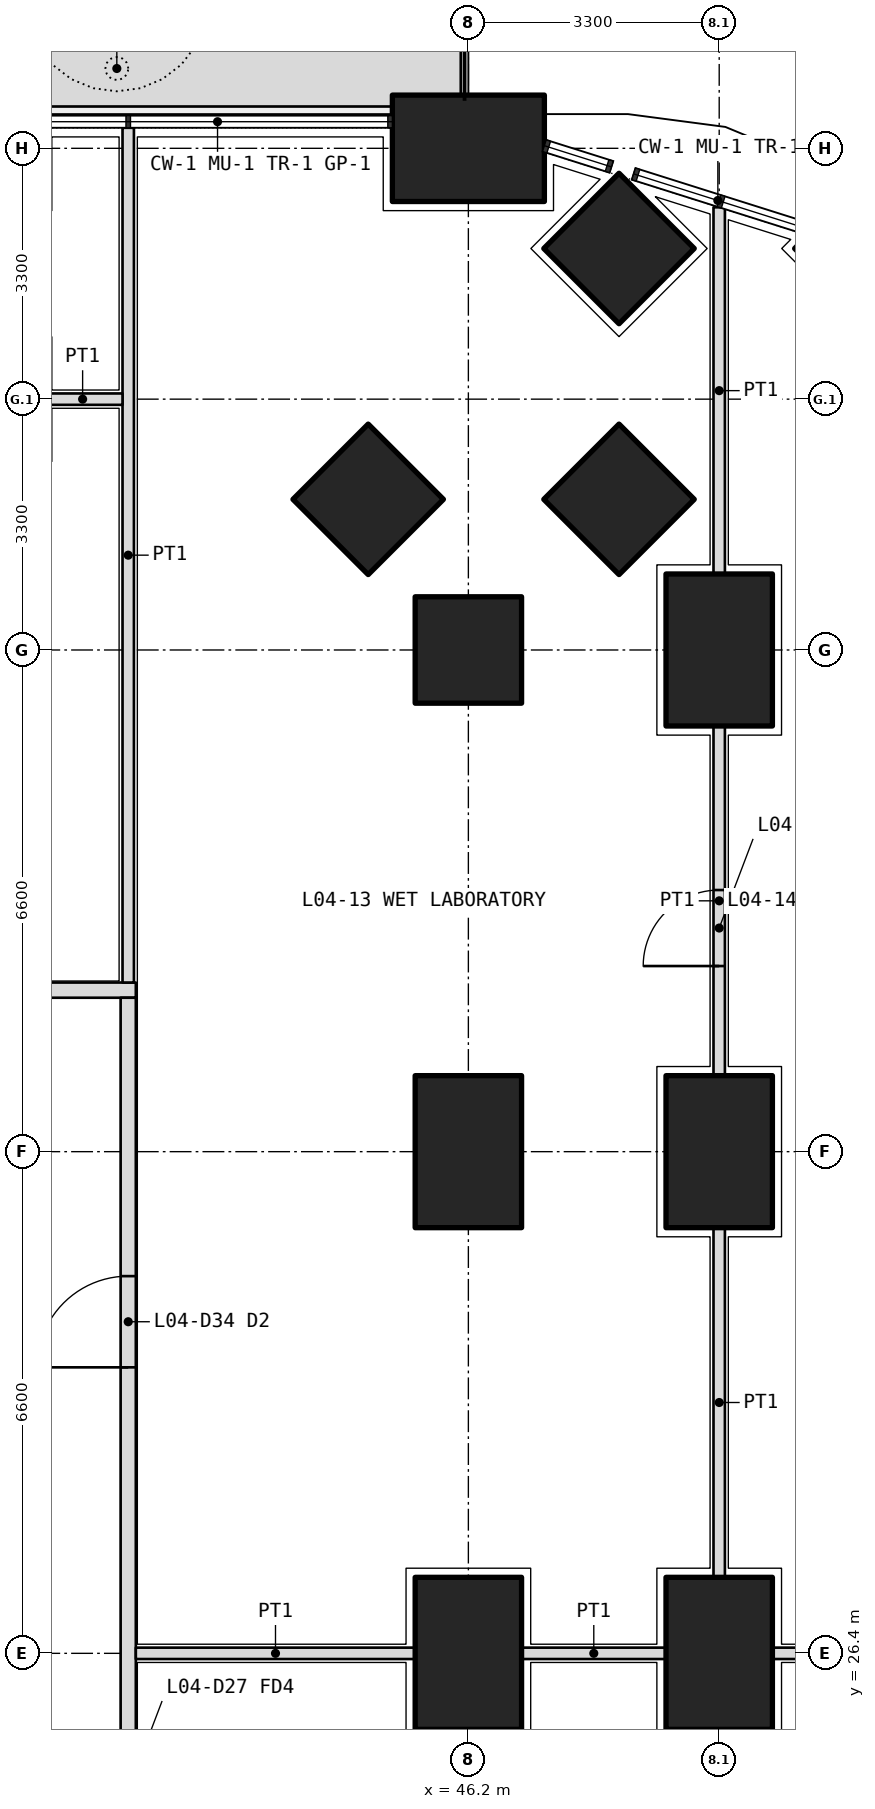
"""IFC4 building model, lengths in metres.
Left out: names, types, materials, properties, quantities, classifications, styles, units other than length and angle.
Written with IfcOpenShell. Run it as: python <this file> out.ifc"""

import sys

from ifc_helpers import new_model, si_unit, direction, frame, frame_2d, origin, origin_2d, place, context, subcontext, project, spatial, polyline, rectangle, outline, extrude, element, fill, save


model = new_model("IFC4")
c1 = context("Model", 3, precision=1e-05, world=origin(), true_north=direction((0.0, 1.0)))
c2 = subcontext(c1, "Body", "Model", "MODEL_VIEW")
j1 = project(units=[si_unit("LENGTHUNIT", "METRE"), si_unit("PLANEANGLEUNIT", "RADIAN")], contexts=[c1])
p1 = place(None, origin())
s1 = spatial("IfcSite", under=j1, at=p1, CompositionType="ELEMENT")
p2 = place(p1, origin())
s2 = spatial("IfcBuilding", under=s1, at=p2, CompositionType="ELEMENT")
p3 = place(p2, frame((0.0, 0.0, 21.3)))
s3 = spatial("IfcBuildingStorey", under=s2, at=p3, CompositionType="ELEMENT", Elevation=21.3)
p4 = place(p3, frame((51.482, 44.882, 0.0), z_axis=(0.0, 0.0, 1.0), x_axis=(0.707106781187, 0.707106781187, 0.0)))
e1 = element("IfcColumn", 1, at=p4, inside=s3, PredefinedType="COLUMN", context=c2, shape_type="SweptSolid", body=[
    extrude(rectangle(XDim=1.4, YDim=1.4, at=origin_2d()), origin(), (0.0, 0.0, 1.0), 4.2),
])
p5 = place(p3, frame((46.2, 46.2, 0.0), z_axis=(0.0, 0.0, 1.0), x_axis=(1.0, 0.0, 0.0)))
e2 = element("IfcColumn", 2, at=p5, inside=s3, PredefinedType="COLUMN", context=c2, shape_type="SweptSolid", body=[
    extrude(rectangle(XDim=2.0, YDim=1.4, at=origin_2d()), origin(), (0.0, 0.0, 1.0), 4.2),
])
for number, where, z_axis, x_axis in (
    (3, (46.2, 39.6, 0.0), (0.0, 0.0, 1.0), (1.0, 0.0, 0.0)),
    (4, (48.182, 44.882, 0.0), (0.0, 0.0, 1.0), (0.707, 0.707, 0.0)),
):
    element("IfcColumn", number, at=place(p3, frame(where, z_axis=z_axis, x_axis=x_axis)), inside=s3, PredefinedType="COLUMN", context=c2, shape_type="SweptSolid", body=[
        extrude(rectangle(XDim=1.4, YDim=1.4, at=origin_2d()), origin(), (0.0, 0.0, 1.0), 4.2),
    ])
for number, where, z_axis, x_axis in (
    (5, (49.5, 26.4, 0.0), (0.0, 0.0, 1.0), (0.0, 1.0, 0.0)),
    (6, (49.5, 33.0, 0.0), (0.0, 0.0, 1.0), (0.0, 1.0, 0.0)),
    (7, (49.5, 39.6, 0.0), (0.0, 0.0, 1.0), (0.0, 1.0, 0.0)),
):
    element("IfcColumn", number, at=place(p3, frame(where, z_axis=z_axis, x_axis=x_axis)), inside=s3, PredefinedType="COLUMN", context=c2, shape_type="SweptSolid", body=[
        extrude(rectangle(XDim=2.0, YDim=1.4, at=origin_2d()), origin(), (0.0, 0.0, 1.0), 4.2),
    ])
for number, where, z_axis, x_axis in (
    (8, (48.182, 41.582, 0.0), (0.0, 0.0, 1.0), (0.707, 0.707, 0.0)),
    (9, (44.882, 41.582, 0.0), (0.0, 0.0, 1.0), (0.707, 0.707, 0.0)),
):
    element("IfcColumn", number, at=place(p3, frame(where, z_axis=z_axis, x_axis=x_axis)), inside=s3, PredefinedType="COLUMN", context=c2, shape_type="SweptSolid", body=[
        extrude(rectangle(XDim=1.4, YDim=1.4, at=origin_2d()), origin(), (0.0, 0.0, 1.0), 4.2),
    ])
for number, where, z_axis, x_axis in (
    (10, (46.2, 26.4, 0.0), (0.0, 0.0, 1.0), (0.0, 1.0, 0.0)),
    (11, (46.2, 33.0, 0.0), (0.0, 0.0, 1.0), (0.0, 1.0, 0.0)),
):
    element("IfcColumn", number, at=place(p3, frame(where, z_axis=z_axis, x_axis=x_axis)), inside=s3, PredefinedType="COLUMN", context=c2, shape_type="SweptSolid", body=[
        extrude(rectangle(XDim=2.0, YDim=1.4, at=origin_2d()), origin(), (0.0, 0.0, 1.0), 4.2),
    ])
p6 = place(p3, origin())
e12 = element("IfcWall", 12, at=p6, inside=s3, PredefinedType="USERDEFINED", context=c2, shape_type="SweptSolid", body=[
    extrude(outline(polyline([(37.05, 46.75), (46.1, 46.75), (46.1, 47.75), (37.05, 47.75), (37.05, 46.75)]), holes=[polyline([(37.2, 46.9), (45.95, 46.9), (45.95, 47.6), (37.2, 47.6), (37.2, 46.9)])]), origin(), (0.0, 0.0, 1.0), 1.05),
])
p7 = place(p3, frame((10.975, 35.125, 0.0), z_axis=(0.0, 0.0, 1.0), x_axis=(1.0, 0.0, 0.0)))
e13 = element("IfcWall", 13, at=p7, inside=s3, PredefinedType="PARTITIONING", context=c2, shape_type="SweptSolid", body=[
    extrude(rectangle(XDim=30.85, YDim=0.2, at=frame_2d((15.425, 0.0))), origin(), (0.0, 0.0, 1.0), 2.85),
])
p8 = place(p7, frame((7.262, 0.0, 0.0)))
e14 = element("IfcOpeningElement", 14, at=p8, cuts=e13, PredefinedType="OPENING", context=c2, shape_type="SweptSolid", body=[
    extrude(rectangle(XDim=1.0, YDim=2.1, at=frame_2d((0.5, 1.05))), frame((0.0, 0.11, 0.0), z_axis=(0.0, -1.0, 0.0), x_axis=(1.0, 0.0, 0.0)), (0.0, 0.0, 1.0), 0.22),
])
p9 = place(p7, frame((22.587, 0.0, 0.0)))
e15 = element("IfcOpeningElement", 15, at=p9, cuts=e13, PredefinedType="OPENING", context=c2, shape_type="SweptSolid", body=[
    extrude(rectangle(XDim=1.0, YDim=2.1, at=frame_2d((0.5, 1.05))), frame((0.0, 0.11, 0.0), z_axis=(0.0, -1.0, 0.0), x_axis=(1.0, 0.0, 0.0)), (0.0, 0.0, 1.0), 0.22),
])
p10 = place(p3, frame((41.725, 11.175, 0.0), z_axis=(0.0, 0.0, 1.0), x_axis=(0.0, 1.0, 0.0)))
e16 = element("IfcWall", 16, at=p10, inside=s3, PredefinedType="PARTITIONING", context=c2, shape_type="SweptSolid", body=[
    extrude(rectangle(XDim=23.85, YDim=0.2, at=frame_2d((11.925, 0.0))), origin(), (0.0, 0.0, 1.0), 2.85),
])
p11 = place(p10, frame((3.762, 0.0, 0.0)))
e17 = element("IfcOpeningElement", 17, at=p11, cuts=e16, PredefinedType="OPENING", context=c2, shape_type="SweptSolid", body=[
    extrude(rectangle(XDim=1.0, YDim=2.1, at=frame_2d((0.5, 1.05))), frame((0.0, 0.11, 0.0), z_axis=(0.0, -1.0, 0.0), x_axis=(1.0, 0.0, 0.0)), (0.0, 0.0, 1.0), 0.22),
])
p12 = place(p10, frame((9.625, 0.0, 0.0)))
e18 = element("IfcOpeningElement", 18, at=p12, cuts=e16, PredefinedType="OPENING", context=c2, shape_type="SweptSolid", body=[
    extrude(rectangle(XDim=1.0, YDim=2.1, at=frame_2d((0.5, 1.05))), frame((0.0, 0.11, 0.0), z_axis=(0.0, -1.0, 0.0), x_axis=(1.0, 0.0, 0.0)), (0.0, 0.0, 1.0), 0.22),
])
p13 = place(p10, frame((12.975, 0.0, 0.0)))
e19 = element("IfcOpeningElement", 19, at=p13, cuts=e16, PredefinedType="OPENING", context=c2, shape_type="SweptSolid", body=[
    extrude(rectangle(XDim=0.9, YDim=2.1, at=frame_2d((0.45, 1.05))), frame((0.0, 0.11, 0.0), z_axis=(0.0, -1.0, 0.0), x_axis=(1.0, 0.0, 0.0)), (0.0, 0.0, 1.0), 0.22),
])
p14 = place(p10, frame((18.988, 0.0, 0.0)))
e20 = element("IfcOpeningElement", 20, at=p14, cuts=e16, PredefinedType="OPENING", context=c2, shape_type="SweptSolid", body=[
    extrude(rectangle(XDim=1.2, YDim=2.1, at=frame_2d((0.6, 1.05))), frame((0.0, 0.11, 0.0), z_axis=(0.0, -1.0, 0.0), x_axis=(1.0, 0.0, 0.0)), (0.0, 0.0, 1.0), 0.22),
])
p15 = place(p3, frame((41.725, 46.47, 0.0), z_axis=(0.0, 0.0, 1.0), x_axis=(0.0, -1.0, 0.0)))
e21 = element("IfcWall", 21, at=p15, inside=s3, PredefinedType="PARTITIONING", context=c2, shape_type="SweptSolid", body=[
    extrude(rectangle(XDim=11.245, YDim=0.15, at=frame_2d((5.623, 0.0))), origin(), (0.0, 0.0, 1.0), 2.7),
])
p16 = place(p3, frame((49.5, 27.4, 0.0), z_axis=(0.0, 0.0, 1.0), x_axis=(0.0, 1.0, 0.0)))
e22 = element("IfcWall", 22, at=p16, inside=s3, PredefinedType="PARTITIONING", context=c2, shape_type="SweptSolid", body=[
    extrude(rectangle(XDim=4.6, YDim=0.15, at=frame_2d((2.3, 0.0))), origin(), (0.0, 0.0, 1.0), 3.9),
])
p17 = place(p3, frame((49.5, 34.0, 0.0), z_axis=(0.0, 0.0, 1.0), x_axis=(0.0, 1.0, 0.0)))
e23 = element("IfcWall", 23, at=p17, inside=s3, PredefinedType="PARTITIONING", context=c2, shape_type="SweptSolid", body=[
    extrude(rectangle(XDim=4.6, YDim=0.15, at=frame_2d((2.3, 0.0))), origin(), (0.0, 0.0, 1.0), 3.9),
])
p18 = place(p17, frame((1.442, 0.0, 0.0)))
e24 = element("IfcOpeningElement", 24, at=p18, cuts=e23, PredefinedType="OPENING", context=c2, shape_type="SweptSolid", body=[
    extrude(rectangle(XDim=1.0, YDim=2.1, at=frame_2d((0.5, 1.05))), frame((0.0, 0.085, 0.0), z_axis=(0.0, -1.0, 0.0), x_axis=(1.0, 0.0, 0.0)), (0.0, 0.0, 1.0), 0.17),
])
p19 = place(p3, frame((49.5, 40.6, 0.0), z_axis=(0.0, 0.0, 1.0), x_axis=(0.0, 1.0, 0.0)))
e25 = element("IfcWall", 25, at=p19, inside=s3, PredefinedType="PARTITIONING", context=c2, shape_type="SweptSolid", body=[
    extrude(rectangle(XDim=4.824, YDim=0.15, at=frame_2d((2.412, 0.0))), origin(), (0.0, 0.0, 1.0), 2.7),
])
for number, where, z_axis, x_axis in (
    (26, (52.1, 26.4, 0.0), (0.0, 0.0, 1.0), (-1.0, 0.0, 0.0)),
    (27, (48.8, 26.4, 0.0), (0.0, 0.0, 1.0), (-1.0, 0.0, 0.0)),
):
    element("IfcWall", number, at=place(p3, frame(where, z_axis=z_axis, x_axis=x_axis)), inside=s3, PredefinedType="PARTITIONING", context=c2, shape_type="SweptSolid", body=[
        extrude(rectangle(XDim=1.9, YDim=0.15, at=frame_2d((0.95, 0.0))), origin(), (0.0, 0.0, 1.0), 2.85),
    ])
p20 = place(p3, frame((45.5, 26.4, 0.0), z_axis=(0.0, 0.0, 1.0), x_axis=(-1.0, 0.0, 0.0)))
e28 = element("IfcWall", 28, at=p20, inside=s3, PredefinedType="PARTITIONING", context=c2, shape_type="SweptSolid", body=[
    extrude(rectangle(XDim=3.675, YDim=0.15, at=frame_2d((1.837, 0.0))), origin(), (0.0, 0.0, 1.0), 2.85),
])
p21 = place(p3, frame((41.65, 42.9, 0.0), z_axis=(0.0, 0.0, 1.0), x_axis=(-1.0, 0.0, 0.0)))
e29 = element("IfcWall", 29, at=p21, inside=s3, PredefinedType="PARTITIONING", context=c2, shape_type="SweptSolid", body=[
    extrude(rectangle(XDim=1.05, YDim=0.15, at=frame_2d((0.525, 0.0))), origin(), (0.0, 0.0, 1.0), 3.9),
])
p22 = place(p14, origin())
e30 = element("IfcDoor", 30, at=p22, inside=s3, OperationType="DOUBLE_DOOR_SINGLE_SWING", PredefinedType="DOOR", context=c2, shape_type="SweptSolid", body=[
    extrude(rectangle(XDim=1.2, YDim=2.1, at=frame_2d((0.6, 1.05))), frame((0.0, 0.025, 0.0), z_axis=(0.0, -1.0, 0.0), x_axis=(1.0, 0.0, 0.0)), (0.0, 0.0, 1.0), 0.05),
])
fill(e20, e30)
p23 = place(p18, origin())
e31 = element("IfcDoor", 31, at=p23, inside=s3, OperationType="SINGLE_SWING_LEFT", PredefinedType="DOOR", context=c2, shape_type="SweptSolid", body=[
    extrude(rectangle(XDim=1.0, YDim=2.1, at=frame_2d((0.5, 1.05))), frame((0.0, 0.025, 0.0), z_axis=(0.0, -1.0, 0.0), x_axis=(1.0, 0.0, 0.0)), (0.0, 0.0, 1.0), 0.05),
])
fill(e24, e31)
save(model, sys.argv[1])
